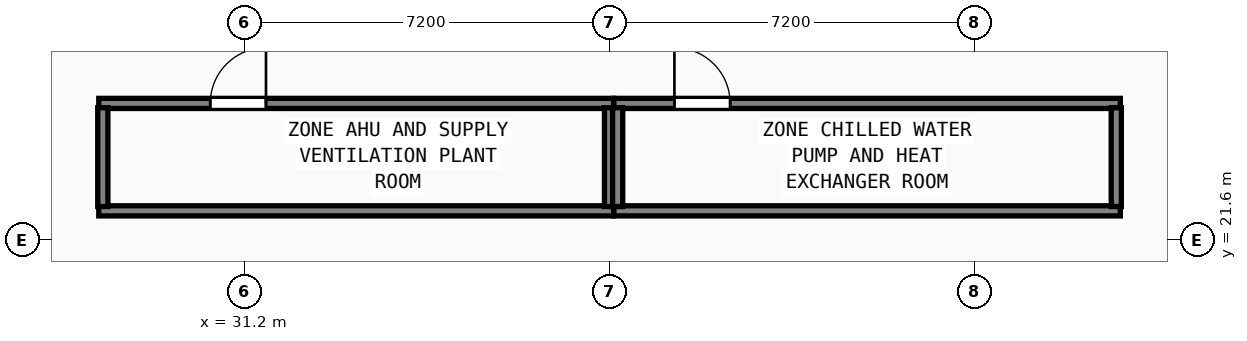
"""IFC4 building model, lengths in metres.
Left out: names, types, materials, properties, quantities, classifications, styles, units other than length and angle.
Written with IfcOpenShell. Run it as: python <this file> out.ifc"""

import sys

from ifc_helpers import new_model, si_unit, direction, frame, frame_2d, origin, origin_2d, place, context, subcontext, project, spatial, rectangle, hollow_rectangle, extrude, element, fill, save


model = new_model("IFC4")
c1 = context("Model", 3, precision=1e-05, world=origin(), true_north=direction((0.0, 1.0)))
c2 = subcontext(c1, "Body", "Model", "MODEL_VIEW")
j1 = project(units=[si_unit("LENGTHUNIT", "METRE"), si_unit("PLANEANGLEUNIT", "RADIAN")], contexts=[c1])
p1 = place(None, origin())
s1 = spatial("IfcSite", under=j1, at=p1, CompositionType="ELEMENT")
p2 = place(p1, origin())
s2 = spatial("IfcBuilding", under=s1, at=p2, CompositionType="ELEMENT")
p3 = place(p2, frame((0.0, 0.0, 43.0)))
s3 = spatial("IfcBuildingStorey", under=s2, at=p3, CompositionType="ELEMENT", Elevation=43.0)
for number, where, z_axis, x_axis in (
    (1, (31.2, 21.6, 0.0), (0.0, 0.0, 1.0), (1.0, 0.0, 0.0)),
    (2, (45.6, 21.6, 0.0), (0.0, 0.0, 1.0), (1.0, 0.0, 0.0)),
):
    element("IfcColumn", number, at=place(p3, frame(where, z_axis=z_axis, x_axis=x_axis)), inside=s3, PredefinedType="COLUMN", context=c2, shape_type="SweptSolid", body=[
        extrude(hollow_rectangle(XDim=1.3, YDim=1.3, WallThickness=0.048, at=origin_2d()), origin(), (0.0, 0.0, 1.0), 4.6),
    ])
p4 = place(p3, frame((38.4, 21.6, 0.0), z_axis=(0.0, 0.0, 1.0), x_axis=(1.0, 0.0, 0.0)))
e3 = element("IfcColumn", 3, at=p4, inside=s3, PredefinedType="COLUMN", context=c2, shape_type="SweptSolid", body=[
    extrude(hollow_rectangle(XDim=1.0, YDim=1.0, WallThickness=0.038, at=origin_2d()), origin(), (0.0, 0.0, 1.0), 4.6),
])
p5 = place(p3, frame((24.642, 21.563, 0.0), z_axis=(0.0, 0.0, 1.0), x_axis=(0.970139161044, -0.242548981051, 0.0)))
e4 = element("IfcWall", 4, at=p5, inside=s3, PredefinedType="PARAPET", context=c2, shape_type="SweptSolid", body=[
    extrude(rectangle(XDim=4.301, YDim=0.16, at=frame_2d((2.15, 0.0))), origin(), (0.0, 0.0, 1.0), 1.15),
])
p6 = place(p3, frame((47.985, 20.52, 0.0), z_axis=(0.0, 0.0, 1.0), x_axis=(0.970142500145, 0.242535625036, 0.0)))
e5 = element("IfcWall", 5, at=p6, inside=s3, PredefinedType="PARAPET", context=c2, shape_type="SweptSolid", body=[
    extrude(rectangle(XDim=4.301, YDim=0.16, at=frame_2d((2.151, 0.0))), origin(), (0.0, 0.0, 1.0), 1.15),
])
p7 = place(p3, frame((28.32, 24.3, 0.0), z_axis=(0.0, 0.0, 1.0), x_axis=(1.0, 0.0, 0.0)))
e6 = element("IfcWall", 6, at=p7, inside=s3, PredefinedType="SOLIDWALL", context=c2, shape_type="SweptSolid", body=[
    extrude(rectangle(XDim=10.16, YDim=0.2, at=frame_2d((5.08, 0.0))), origin(), (0.0, 0.0, 1.0), 4.4),
])
p8 = place(p7, frame((3.3, 0.0, 0.0), z_axis=(0.0, 0.0, 1.0), x_axis=(-1.0, 0.0, 0.0)))
e7 = element("IfcOpeningElement", 7, at=p8, cuts=e6, PredefinedType="OPENING", context=c2, shape_type="SweptSolid", body=[
    extrude(rectangle(XDim=1.1, YDim=2.15, at=frame_2d((0.55, 1.075))), frame((0.0, 0.11, 0.0), z_axis=(0.0, -1.0, 0.0), x_axis=(1.0, 0.0, 0.0)), (0.0, 0.0, 1.0), 0.22),
])
p9 = place(p3, frame((28.32, 22.18, 0.0), z_axis=(0.0, 0.0, 1.0), x_axis=(1.0, 0.0, 0.0)))
e8 = element("IfcWall", 8, at=p9, inside=s3, PredefinedType="SOLIDWALL", context=c2, shape_type="SweptSolid", body=[
    extrude(rectangle(XDim=10.16, YDim=0.2, at=frame_2d((5.08, 0.0))), origin(), (0.0, 0.0, 1.0), 4.4),
])
p10 = place(p3, frame((28.4, 22.265, 0.0), z_axis=(0.0, 0.0, 1.0), x_axis=(0.0, 1.0, 0.0)))
e9 = element("IfcWall", 9, at=p10, inside=s3, PredefinedType="SOLIDWALL", context=c2, shape_type="SweptSolid", body=[
    extrude(rectangle(XDim=1.95, YDim=0.2, at=frame_2d((0.975, 0.0))), origin(), (0.0, 0.0, 1.0), 4.4),
])
p11 = place(p3, frame((38.4, 22.265, 0.0), z_axis=(0.0, 0.0, 1.0), x_axis=(0.0, 1.0, 0.0)))
e10 = element("IfcWall", 10, at=p11, inside=s3, PredefinedType="SOLIDWALL", context=c2, shape_type="SweptSolid", body=[
    extrude(rectangle(XDim=1.95, YDim=0.2, at=frame_2d((0.975, 0.0))), origin(), (0.0, 0.0, 1.0), 3.785),
])
p12 = place(p3, frame((38.485, 24.3, 0.0), z_axis=(0.0, 0.0, 1.0), x_axis=(1.0, 0.0, 0.0)))
e11 = element("IfcWall", 11, at=p12, inside=s3, PredefinedType="SOLIDWALL", context=c2, shape_type="SweptSolid", body=[
    extrude(rectangle(XDim=9.995, YDim=0.2, at=frame_2d((4.998, 0.0))), origin(), (0.0, 0.0, 1.0), 4.4),
])
p13 = place(p12, frame((2.295, 0.0, 0.0), z_axis=(0.0, 0.0, 1.0), x_axis=(-1.0, 0.0, 0.0)))
e12 = element("IfcOpeningElement", 12, at=p13, cuts=e11, PredefinedType="OPENING", context=c2, shape_type="SweptSolid", body=[
    extrude(rectangle(XDim=1.1, YDim=2.15, at=frame_2d((0.55, 1.075))), frame((0.0, 0.11, 0.0), z_axis=(0.0, -1.0, 0.0), x_axis=(1.0, 0.0, 0.0)), (0.0, 0.0, 1.0), 0.22),
])
p14 = place(p3, frame((38.485, 22.18, 0.0), z_axis=(0.0, 0.0, 1.0), x_axis=(1.0, 0.0, 0.0)))
e13 = element("IfcWall", 13, at=p14, inside=s3, PredefinedType="SOLIDWALL", context=c2, shape_type="SweptSolid", body=[
    extrude(rectangle(XDim=9.995, YDim=0.2, at=frame_2d((4.998, 0.0))), origin(), (0.0, 0.0, 1.0), 4.4),
])
p15 = place(p3, frame((38.56, 22.265, 0.0), z_axis=(0.0, 0.0, 1.0), x_axis=(0.0, 1.0, 0.0)))
e14 = element("IfcWall", 14, at=p15, inside=s3, PredefinedType="SOLIDWALL", context=c2, shape_type="SweptSolid", body=[
    extrude(rectangle(XDim=1.95, YDim=0.2, at=frame_2d((0.975, 0.0))), origin(), (0.0, 0.0, 1.0), 3.785),
])
p16 = place(p3, frame((48.4, 22.265, 0.0), z_axis=(0.0, 0.0, 1.0), x_axis=(0.0, 1.0, 0.0)))
e15 = element("IfcWall", 15, at=p16, inside=s3, PredefinedType="SOLIDWALL", context=c2, shape_type="SweptSolid", body=[
    extrude(rectangle(XDim=1.95, YDim=0.2, at=frame_2d((0.975, 0.0))), origin(), (0.0, 0.0, 1.0), 4.4),
])
p17 = place(p8, origin())
e16 = element("IfcDoor", 16, at=p17, inside=s3, OperationType="SINGLE_SWING_LEFT", PredefinedType="DOOR", context=c2, shape_type="SweptSolid", body=[
    extrude(rectangle(XDim=1.1, YDim=2.15, at=frame_2d((0.55, 1.075))), frame((0.0, 0.025, 0.0), z_axis=(0.0, -1.0, 0.0), x_axis=(1.0, 0.0, 0.0)), (0.0, 0.0, 1.0), 0.05),
])
fill(e7, e16)
p18 = place(p13, origin())
e17 = element("IfcDoor", 17, at=p18, inside=s3, OperationType="SINGLE_SWING_RIGHT", PredefinedType="DOOR", context=c2, shape_type="SweptSolid", body=[
    extrude(rectangle(XDim=1.1, YDim=2.15, at=frame_2d((0.55, 1.075))), frame((0.0, 0.025, 0.0), z_axis=(0.0, -1.0, 0.0), x_axis=(1.0, 0.0, 0.0)), (0.0, 0.0, 1.0), 0.05),
])
fill(e12, e17)
save(model, sys.argv[1])
